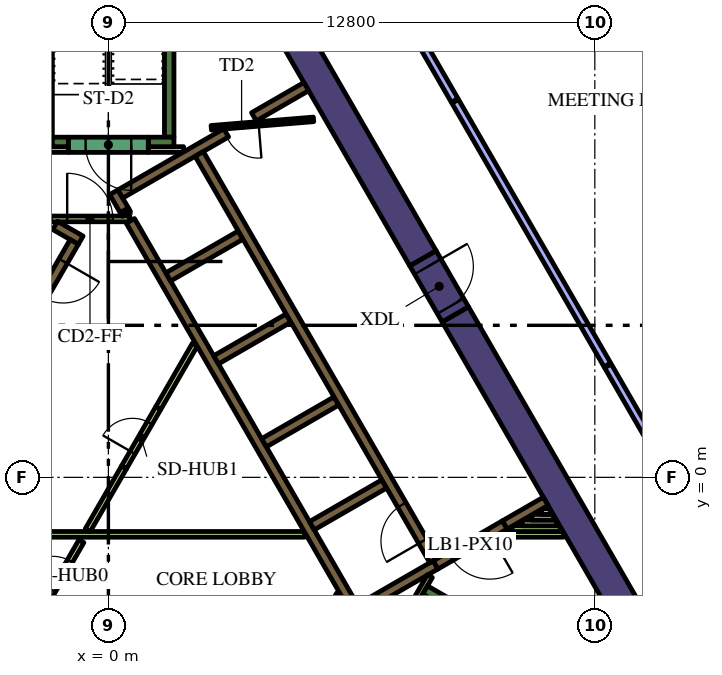
"""IFC4 building model, lengths in metres.
Left out: names, types, materials, properties, quantities, classifications, styles, units other than length and angle.
Written with IfcOpenShell. Run it as: python <this file> out.ifc"""

import sys

from ifc_helpers import new_model, si_unit, direction, frame, frame_2d, origin, place, context, subcontext, project, spatial, rectangle, extrude, element, fill, save


model = new_model("IFC4")
c1 = context("Model", 3, precision=1e-05, world=origin(), true_north=direction((0.0, 1.0)))
c2 = subcontext(c1, "Body", "Model", "MODEL_VIEW")
j1 = project(units=[si_unit("LENGTHUNIT", "METRE"), si_unit("PLANEANGLEUNIT", "RADIAN")], contexts=[c1])
p1 = place(None, origin())
s1 = spatial("IfcSite", under=j1, at=p1, CompositionType="ELEMENT")
p2 = place(p1, origin())
s2 = spatial("IfcBuilding", under=s1, at=p2, CompositionType="ELEMENT")
p3 = place(p2, frame((0.0, 0.0, 175.2)))
s3 = spatial("IfcBuildingStorey", under=s2, at=p3, CompositionType="ELEMENT", Elevation=175.2)
p4 = place(p3, frame((9.129, 4.289, 0.0), z_axis=(0.0, 0.0, 1.0), x_axis=(0.499995742806, -0.866027861663, 0.0)))
e1 = element("IfcWall", 1, at=p4, inside=s3, PredefinedType="SOLIDWALL", context=c2, shape_type="SweptSolid", body=[
    extrude(rectangle(XDim=12.527, YDim=0.8, at=frame_2d((6.264, 0.0))), origin(), (0.0, 0.0, 1.0), 4.2),
])
p5 = place(p3, frame((8.279, 5.761, 0.0), z_axis=(0.0, 0.0, 1.0), x_axis=(-0.500010359015, 0.866019422922, 0.0)))
e2 = element("IfcWall", 2, at=p5, inside=s3, PredefinedType="SOLIDWALL", context=c2, shape_type="SweptSolid", body=[
    extrude(rectangle(XDim=12.528, YDim=0.8, at=frame_2d((6.264, 0.0))), origin(), (0.0, 0.0, 1.0), 4.2),
])
p6 = place(p3, frame((8.334, -2.964, 0.0), z_axis=(0.0, 0.0, 1.0), x_axis=(0.866016039709, -0.500016218704, 0.0)))
e3 = element("IfcWall", 3, at=p6, inside=s3, PredefinedType="SOLIDWALL", context=c2, shape_type="SweptSolid", body=[
    extrude(rectangle(XDim=7.05, YDim=0.25, at=frame_2d((3.525, 0.0))), origin(), (0.0, 0.0, 1.0), 4.2),
])
p7 = place(p3, frame((8.168, -3.503, 0.0), z_axis=(0.0, 0.0, 1.0), x_axis=(0.49972245349, 0.866185586049, 0.0)))
e4 = element("IfcWall", 4, at=p7, inside=s3, PredefinedType="SOLIDWALL", context=c2, shape_type="SweptSolid", body=[
    extrude(rectangle(XDim=0.425, YDim=0.25, at=frame_2d((0.212, 0.0))), origin(), (0.0, 0.0, 1.0), 4.2),
])
p8 = place(p3, frame((1.6, 8.95, 0.0), z_axis=(0.0, 0.0, 1.0), x_axis=(0.0, 1.0, 0.0)))
e5 = element("IfcWall", 5, at=p8, inside=s3, PredefinedType="SOLIDWALL", context=c2, shape_type="SweptSolid", body=[
    extrude(rectangle(XDim=6.8, YDim=0.25, at=frame_2d((3.4, 0.0))), origin(), (0.0, 0.0, 1.0), 4.2),
])
p9 = place(p3, frame((1.05, 8.825, 0.0), z_axis=(0.0, 0.0, 1.0), x_axis=(1.0, 0.0, 0.0)))
e6 = element("IfcWall", 6, at=p9, inside=s3, PredefinedType="SOLIDWALL", context=c2, shape_type="SweptSolid", body=[
    extrude(rectangle(XDim=0.675, YDim=0.25, at=frame_2d((0.337, 0.0))), origin(), (0.0, 0.0, 1.0), 4.2),
])
p10 = place(p3, frame((-1.6, 8.7, 0.0), z_axis=(0.0, 0.0, 1.0), x_axis=(0.0, 1.0, 0.0)))
e7 = element("IfcWall", 7, at=p10, inside=s3, PredefinedType="SOLIDWALL", context=c2, shape_type="SweptSolid", body=[
    extrude(rectangle(XDim=7.05, YDim=0.25, at=frame_2d((3.525, 0.0))), origin(), (0.0, 0.0, 1.0), 4.2),
])
p11 = place(p3, frame((-1.475, 8.825, 0.0), z_axis=(0.0, 0.0, 1.0), x_axis=(1.0, 0.0, 0.0)))
e8 = element("IfcWall", 8, at=p11, inside=s3, PredefinedType="SOLIDWALL", context=c2, shape_type="SweptSolid", body=[
    extrude(rectangle(XDim=0.425, YDim=0.25, at=frame_2d((0.212, 0.0))), origin(), (0.0, 0.0, 1.0), 4.2),
])
p12 = place(p3, frame((11.507, -0.631, 0.0), z_axis=(0.0, 0.0, 1.0), x_axis=(-0.866025525965, -0.499999788377, 0.0)))
e9 = element("IfcWall", 9, at=p12, inside=s3, PredefinedType="SOLIDWALL", context=c2, shape_type="SweptSolid", body=[
    extrude(rectangle(XDim=1.245, YDim=0.25, at=frame_2d((0.622, 0.0))), origin(), (0.0, 0.0, 1.0), 4.2),
])
p13 = place(p3, frame((0.473, 6.93, 0.0), z_axis=(0.0, 0.0, 1.0), x_axis=(-0.49972245349, 0.866185586049, 0.0)))
e10 = element("IfcWall", 10, at=p13, inside=s3, PredefinedType="SOLIDWALL", context=c2, shape_type="SweptSolid", body=[
    extrude(rectangle(XDim=0.11, YDim=0.25, at=frame_2d((0.055, 0.0))), origin(), (0.0, 0.0, 1.0), 4.2),
])
p14 = place(p3, frame((6.568, -3.627, 0.0), z_axis=(0.0, 0.0, 1.0), x_axis=(-0.499999455981, 0.866025717874, 0.0)))
e11 = element("IfcWall", 11, at=p14, inside=s3, PredefinedType="SOLIDWALL", context=c2, shape_type="SweptSolid", body=[
    extrude(rectangle(XDim=11.978, YDim=0.25, at=frame_2d((5.989, 0.0))), origin(), (0.0, 0.0, 1.0), 4.2),
])
p15 = place(p3, frame((0.417, 7.027, 0.0), z_axis=(0.0, 0.0, 1.0), x_axis=(-0.500210807569, 0.865903659763, 0.0)))
e12 = element("IfcWall", 12, at=p15, inside=s3, PredefinedType="SOLIDWALL", context=c2, shape_type="SweptSolid", body=[
    extrude(rectangle(XDim=0.548, YDim=0.25, at=frame_2d((0.274, 0.0))), origin(), (0.0, 0.0, 1.0), 4.2),
])
p16 = place(p3, frame((3.1, 9.064, 0.0), z_axis=(0.0, 0.0, 1.0), x_axis=(-0.866030133475, -0.499991807846, 0.0)))
e13 = element("IfcWall", 13, at=p16, inside=s3, PredefinedType="SOLIDWALL", context=c2, shape_type="SweptSolid", body=[
    extrude(rectangle(XDim=3.217, YDim=0.25, at=frame_2d((1.608, 0.0))), origin(), (0.0, 0.0, 1.0), 4.2),
])
p17 = place(p3, frame((1.574, 5.274, 0.0), z_axis=(0.0, 0.0, 1.0), x_axis=(0.866028486751, 0.499994660107, 0.0)))
e14 = element("IfcWall", 14, at=p17, inside=s3, PredefinedType="SOLIDWALL", context=c2, shape_type="SweptSolid", body=[
    extrude(rectangle(XDim=2.2, YDim=0.25, at=frame_2d((1.1, 0.0))), origin(), (0.0, 0.0, 1.0), 4.2),
])
for number, where, z_axis, x_axis in (
    (15, (2.834, 3.091, 0.0), (0.0, 0.0, 1.0), (0.866, 0.5, 0.0)),
    (16, (4.094, 0.909, 0.0), (0.0, 0.0, 1.0), (0.866, 0.5, 0.0)),
    (17, (5.354, -1.274, 0.0), (0.0, 0.0, 1.0), (0.866, 0.5, 0.0)),
):
    element("IfcWall", number, at=place(p3, frame(where, z_axis=z_axis, x_axis=x_axis)), inside=s3, PredefinedType="SOLIDWALL", context=c2, shape_type="SweptSolid", body=[
        extrude(rectangle(XDim=2.2, YDim=0.25, at=frame_2d((1.1, 0.0))), origin(), (0.0, 0.0, 1.0), 4.2),
    ])
p18 = place(p3, frame((6.614, -3.456, 0.0), z_axis=(0.0, 0.0, 1.0), x_axis=(0.866025089694, 0.500000544019, 0.0)))
e18 = element("IfcWall", 18, at=p18, inside=s3, PredefinedType="SOLIDWALL", context=c2, shape_type="SweptSolid", body=[
    extrude(rectangle(XDim=2.305, YDim=0.25, at=frame_2d((1.153, 0.0))), origin(), (0.0, 0.0, 1.0), 4.2),
])
p19 = place(p3, frame((3.83, 9.486, 0.0), z_axis=(0.0, 0.0, 1.0), x_axis=(0.865986202621, 0.500067892261, 0.0)))
e19 = element("IfcWall", 19, at=p19, inside=s3, PredefinedType="SOLIDWALL", context=c2, shape_type="SweptSolid", body=[
    extrude(rectangle(XDim=1.591, YDim=0.25, at=frame_2d((0.795, 0.0))), origin(), (0.0, 0.0, 1.0), 4.2),
])
p20 = place(p3, frame((-0.728, 6.24, 0.0), z_axis=(0.0, 0.0, 1.0), x_axis=(-0.865955664968, 0.500120771724, 0.0)))
e20 = element("IfcWall", 20, at=p20, inside=s3, PredefinedType="SOLIDWALL", context=c2, shape_type="SweptSolid", body=[
    extrude(rectangle(XDim=0.778, YDim=0.25, at=frame_2d((0.389, 0.0))), origin(), (0.0, 0.0, 1.0), 4.2),
])
p21 = place(p3, frame((1.05, 8.625, 0.0), z_axis=(0.0, 0.0, 1.0), x_axis=(1.0, 0.0, 0.0)))
e21 = element("IfcWall", 21, at=p21, inside=s3, PredefinedType="PARTITIONING", context=c2, shape_type="SweptSolid", body=[
    extrude(rectangle(XDim=0.929, YDim=0.15, at=frame_2d((0.464, 0.0))), origin(), (0.0, 0.0, 1.0), 3.15),
])
p22 = place(p3, frame((-1.564, 8.625, 0.0), z_axis=(0.0, 0.0, 1.0), x_axis=(1.0, 0.0, 0.0)))
e22 = element("IfcWall", 22, at=p22, inside=s3, PredefinedType="PARTITIONING", context=c2, shape_type="SweptSolid", body=[
    extrude(rectangle(XDim=0.514, YDim=0.15, at=frame_2d((0.257, 0.0))), origin(), (0.0, 0.0, 1.0), 3.15),
])
p23 = place(p3, frame((10.362, -1.5, 0.0), z_axis=(0.0, 0.0, 1.0), x_axis=(1.0, 0.0, 0.0)))
e23 = element("IfcWall", 23, at=p23, inside=s3, PredefinedType="PARTITIONING", context=c2, shape_type="SweptSolid", body=[
    extrude(rectangle(XDim=1.61, YDim=0.15, at=frame_2d((0.805, 0.0))), origin(), (0.0, 0.0, 1.0), 3.15),
])
p24 = place(p3, frame((10.622, -1.35, 0.0), z_axis=(0.0, 0.0, 1.0), x_axis=(1.0, 0.0, 0.0)))
e24 = element("IfcWall", 24, at=p24, inside=s3, PredefinedType="PARTITIONING", context=c2, shape_type="SweptSolid", body=[
    extrude(rectangle(XDim=1.263, YDim=0.15, at=frame_2d((0.632, 0.0))), origin(), (0.0, 0.0, 1.0), 3.15),
])
p25 = place(p3, frame((10.882, -1.2, 0.0), z_axis=(0.0, 0.0, 1.0), x_axis=(1.0, 0.0, 0.0)))
e25 = element("IfcWall", 25, at=p25, inside=s3, PredefinedType="PARTITIONING", context=c2, shape_type="SweptSolid", body=[
    extrude(rectangle(XDim=0.917, YDim=0.15, at=frame_2d((0.459, 0.0))), origin(), (0.0, 0.0, 1.0), 3.15),
])
p26 = place(p3, frame((11.712, -1.05, 0.0), z_axis=(0.0, 0.0, 1.0), x_axis=(-1.0, 0.0, 0.0)))
e26 = element("IfcWall", 26, at=p26, inside=s3, PredefinedType="PARTITIONING", context=c2, shape_type="SweptSolid", body=[
    extrude(rectangle(XDim=0.571, YDim=0.15, at=frame_2d((0.285, 0.0))), origin(), (0.0, 0.0, 1.0), 3.15),
])
p27 = place(p3, frame((11.401, -0.9, 0.0), z_axis=(0.0, 0.0, 1.0), x_axis=(1.0, 0.0, 0.0)))
e27 = element("IfcWall", 27, at=p27, inside=s3, PredefinedType="PARTITIONING", context=c2, shape_type="SweptSolid", body=[
    extrude(rectangle(XDim=0.224, YDim=0.15, at=frame_2d((0.112, 0.0))), origin(), (0.0, 0.0, 1.0), 3.15),
])
p28 = place(p3, frame((8.459, -2.599, 0.0), z_axis=(0.0, 0.0, 1.0), x_axis=(-0.500041054325, -0.866001699761, 0.0)))
e28 = element("IfcWall", 28, at=p28, inside=s3, PredefinedType="PARTITIONING", context=c2, shape_type="SweptSolid", body=[
    extrude(rectangle(XDim=0.929, YDim=0.15, at=frame_2d((0.464, 0.0))), origin(), (0.0, 0.0, 1.0), 4.2),
])
p29 = place(p3, frame((5.705, -3.718, 0.0), z_axis=(0.0, 0.0, 1.0), x_axis=(0.499962090823, 0.866047289552, 0.0)))
e29 = element("IfcWall", 29, at=p29, inside=s3, PredefinedType="PARTITIONING", context=c2, shape_type="SweptSolid", body=[
    extrude(rectangle(XDim=0.735, YDim=0.15, at=frame_2d((0.367, 0.0))), origin(), (0.0, 0.0, 1.0), 3.15),
])
p30 = place(p3, frame((-4.2, -1.5, 0.0), z_axis=(0.0, 0.0, 1.0), x_axis=(1.0, 0.0, 0.0)))
e30 = element("IfcWall", 30, at=p30, inside=s3, PredefinedType="PARTITIONING", context=c2, shape_type="SweptSolid", body=[
    extrude(rectangle(XDim=9.359, YDim=0.15, at=frame_2d((4.68, 0.0))), origin(), (0.0, 0.0, 1.0), 3.15),
])
p31 = place(p3, frame((-0.544, -1.393, 0.0), z_axis=(0.0, 0.0, 1.0), x_axis=(0.499928740635, 0.866066541489, 0.0)))
e31 = element("IfcWall", 31, at=p31, inside=s3, PredefinedType="PARTITIONING", context=c2, shape_type="SweptSolid", body=[
    extrude(rectangle(XDim=1.912, YDim=0.15, at=frame_2d((0.956, 0.0))), origin(), (0.0, 0.0, 1.0), 3.15),
])
p32 = place(p3, frame((1.312, 1.822, 0.0), z_axis=(0.0, 0.0, 1.0), x_axis=(0.500003549559, 0.866023354436, 0.0)))
e32 = element("IfcWall", 32, at=p32, inside=s3, PredefinedType="PARTITIONING", context=c2, shape_type="SweptSolid", body=[
    extrude(rectangle(XDim=1.93, YDim=0.15, at=frame_2d((0.965, 0.0))), origin(), (0.0, 0.0, 1.0), 3.15),
])
p33 = place(p3, frame((8.565, -2.185, 0.0), z_axis=(0.0, 0.0, 1.0), x_axis=(-0.499997954832, 0.866026584559, 0.0)))
e33 = element("IfcWall", 33, at=p33, inside=s3, PredefinedType="SOLIDWALL", context=c2, shape_type="SweptSolid", body=[
    extrude(rectangle(XDim=12.35, YDim=0.25, at=frame_2d((6.175, 0.0))), origin(), (0.0, 0.0, 1.0), 4.2),
])
p34 = place(p33, frame((0.585, 0.0, 0.0)))
e34 = element("IfcOpeningElement", 34, at=p34, cuts=e33, PredefinedType="OPENING", context=c2, shape_type="SweptSolid", body=[
    extrude(rectangle(XDim=1.1, YDim=2.1, at=frame_2d((0.55, 1.05))), frame((0.0, 0.135, 0.0), z_axis=(0.0, -1.0, 0.0), x_axis=(1.0, 0.0, 0.0)), (0.0, 0.0, 1.0), 0.27),
])
p35 = place(p3, frame((-0.898, 6.194, 0.0), z_axis=(0.0, 0.0, 1.0), x_axis=(-0.499996202215, -0.866027596426, 0.0)))
e35 = element("IfcWall", 35, at=p35, inside=s3, PredefinedType="SOLIDWALL", context=c2, shape_type="SweptSolid", body=[
    extrude(rectangle(XDim=9.83, YDim=0.25, at=frame_2d((4.915, 0.0))), origin(), (0.0, 0.0, 1.0), 4.2),
])
p36 = place(p35, frame((0.585, 0.0, 0.0)))
e36 = element("IfcOpeningElement", 36, at=p36, cuts=e35, PredefinedType="OPENING", context=c2, shape_type="SweptSolid", body=[
    extrude(rectangle(XDim=1.1, YDim=2.1, at=frame_2d((0.55, 1.05))), frame((0.0, 0.135, 0.0), z_axis=(0.0, -1.0, 0.0), x_axis=(1.0, 0.0, 0.0)), (0.0, 0.0, 1.0), 0.27),
])
p37 = place(p35, frame((3.105, 0.0, 0.0)))
e37 = element("IfcOpeningElement", 37, at=p37, cuts=e35, PredefinedType="OPENING", context=c2, shape_type="SweptSolid", body=[
    extrude(rectangle(XDim=1.1, YDim=2.1, at=frame_2d((0.55, 1.05))), frame((0.0, 0.135, 0.0), z_axis=(0.0, -1.0, 0.0), x_axis=(1.0, 0.0, 0.0)), (0.0, 0.0, 1.0), 0.27),
])
p38 = place(p35, frame((5.625, 0.0, 0.0)))
e38 = element("IfcOpeningElement", 38, at=p38, cuts=e35, PredefinedType="OPENING", context=c2, shape_type="SweptSolid", body=[
    extrude(rectangle(XDim=1.1, YDim=2.1, at=frame_2d((0.55, 1.05))), frame((0.0, 0.135, 0.0), z_axis=(0.0, -1.0, 0.0), x_axis=(1.0, 0.0, 0.0)), (0.0, 0.0, 1.0), 0.27),
])
p39 = place(p35, frame((8.145, 0.0, 0.0)))
e39 = element("IfcOpeningElement", 39, at=p39, cuts=e35, PredefinedType="OPENING", context=c2, shape_type="SweptSolid", body=[
    extrude(rectangle(XDim=1.1, YDim=2.1, at=frame_2d((0.55, 1.05))), frame((0.0, 0.135, 0.0), z_axis=(0.0, -1.0, 0.0), x_axis=(1.0, 0.0, 0.0)), (0.0, 0.0, 1.0), 0.27),
])
p40 = place(p3, frame((1.05, 8.75, 0.0), z_axis=(0.0, 0.0, 1.0), x_axis=(-1.0, 0.0, 0.0)))
e40 = element("IfcWall", 40, at=p40, inside=s3, PredefinedType="SOLIDWALL", context=c2, shape_type="SweptSolid", body=[
    extrude(rectangle(XDim=2.1, YDim=0.4, at=frame_2d((1.05, 0.0))), origin(), (0.0, 0.0, 1.0), 4.2),
])
p41 = place(p40, frame((0.45, 0.0, 0.0)))
e41 = element("IfcOpeningElement", 41, at=p41, cuts=e40, PredefinedType="OPENING", context=c2, shape_type="SweptSolid", body=[
    extrude(rectangle(XDim=1.2, YDim=2.1, at=frame_2d((0.6, 1.05))), frame((0.0, 0.21, 0.0), z_axis=(0.0, -1.0, 0.0), x_axis=(1.0, 0.0, 0.0)), (0.0, 0.0, 1.0), 0.42),
])
p42 = place(p3, frame((5.398, 9.419, 0.0), z_axis=(0.0, 0.0, 1.0), x_axis=(-0.996653416376, -0.081743303248, 0.0)))
e42 = element("IfcWall", 42, at=p42, inside=s3, PredefinedType="PARTITIONING", context=c2, shape_type="SweptSolid", body=[
    extrude(rectangle(XDim=2.7, YDim=0.12, at=frame_2d((1.35, 0.0))), origin(), (0.0, 0.0, 1.0), 3.15),
])
p43 = place(p42, frame((1.45, 0.0, 0.0)))
e43 = element("IfcOpeningElement", 43, at=p43, cuts=e42, PredefinedType="OPENING", context=c2, shape_type="SweptSolid", body=[
    extrude(rectangle(XDim=0.9, YDim=2.1, at=frame_2d((0.45, 1.05))), frame((0.0, 0.07, 0.0), z_axis=(0.0, -1.0, 0.0), x_axis=(1.0, 0.0, 0.0)), (0.0, 0.0, 1.0), 0.14),
])
p44 = place(p3, frame((-1.76, -3.498, 0.0), z_axis=(0.0, 0.0, 1.0), x_axis=(0.499977374825, 0.866038466041, 0.0)))
e44 = element("IfcWall", 44, at=p44, inside=s3, PredefinedType="PARTITIONING", context=c2, shape_type="SweptSolid", body=[
    extrude(rectangle(XDim=2.1, YDim=0.15, at=frame_2d((1.05, 0.0))), origin(), (0.0, 0.0, 1.0), 3.15),
])
p45 = place(p44, frame((0.6, 0.0, 0.0)))
e45 = element("IfcOpeningElement", 45, at=p45, cuts=e44, PredefinedType="OPENING", context=c2, shape_type="SweptSolid", body=[
    extrude(rectangle(XDim=0.9, YDim=2.1, at=frame_2d((0.45, 1.05))), frame((0.0, 0.085, 0.0), z_axis=(0.0, -1.0, 0.0), x_axis=(1.0, 0.0, 0.0)), (0.0, 0.0, 1.0), 0.17),
])
p46 = place(p3, frame((-1.534, 6.8, 0.0), z_axis=(0.0, 0.0, 1.0), x_axis=(1.0, 0.0, 0.0)))
e46 = element("IfcWall", 46, at=p46, inside=s3, PredefinedType="PARTITIONING", context=c2, shape_type="SweptSolid", body=[
    extrude(rectangle(XDim=2.1, YDim=0.15, at=frame_2d((1.05, 0.0))), origin(), (0.0, 0.0, 1.0), 3.15),
])
p47 = place(p46, frame((0.45, 0.0, 0.0)))
e47 = element("IfcOpeningElement", 47, at=p47, cuts=e46, PredefinedType="OPENING", context=c2, shape_type="SweptSolid", body=[
    extrude(rectangle(XDim=1.2, YDim=2.1, at=frame_2d((0.6, 1.05))), frame((0.0, 0.085, 0.0), z_axis=(0.0, -1.0, 0.0), x_axis=(1.0, 0.0, 0.0)), (0.0, 0.0, 1.0), 0.17),
])
p48 = place(p3, frame((10.429, -1.253, 0.0), z_axis=(0.0, 0.0, 1.0), x_axis=(-0.866009402589, -0.500027713859, 0.0)))
e48 = element("IfcWall", 48, at=p48, inside=s3, PredefinedType="SOLIDWALL", context=c2, shape_type="SweptSolid", body=[
    extrude(rectangle(XDim=2.1, YDim=0.25, at=frame_2d((1.05, 0.0))), origin(), (0.0, 0.0, 1.0), 4.2),
])
p49 = place(p48, frame((0.45, 0.0, 0.0)))
e49 = element("IfcOpeningElement", 49, at=p49, cuts=e48, PredefinedType="OPENING", context=c2, shape_type="SweptSolid", body=[
    extrude(rectangle(XDim=1.2, YDim=2.1, at=frame_2d((0.6, 1.05))), frame((0.0, 0.135, 0.0), z_axis=(0.0, -1.0, 0.0), x_axis=(1.0, 0.0, 0.0)), (0.0, 0.0, 1.0), 0.27),
])
p50 = place(p3, frame((8.279, 5.761, 0.0), z_axis=(0.0, 0.0, 1.0), x_axis=(0.500062241894, -0.865989465428, 0.0)))
e50 = element("IfcWall", 50, at=p50, inside=s3, PredefinedType="SOLIDWALL", context=c2, shape_type="SweptSolid", body=[
    extrude(rectangle(XDim=1.7, YDim=0.8, at=frame_2d((0.85, 0.0))), origin(), (0.0, 0.0, 1.0), 4.2),
])
p51 = place(p50, frame((0.25, 0.0, 0.0)))
e51 = element("IfcOpeningElement", 51, at=p51, cuts=e50, PredefinedType="OPENING", context=c2, shape_type="SweptSolid", body=[
    extrude(rectangle(XDim=1.2, YDim=2.1, at=frame_2d((0.6, 1.05))), frame((0.0, 0.41, 0.0), z_axis=(0.0, -1.0, 0.0), x_axis=(1.0, 0.0, 0.0)), (0.0, 0.0, 1.0), 0.82),
])
p52 = place(p3, frame((0.412, 0.263, 0.0), z_axis=(0.0, 0.0, 1.0), x_axis=(0.500062916607, 0.865989075817, 0.0)))
e52 = element("IfcWall", 52, at=p52, inside=s3, PredefinedType="PARTITIONING", context=c2, shape_type="SweptSolid", body=[
    extrude(rectangle(XDim=1.8, YDim=0.15, at=frame_2d((0.9, 0.0))), origin(), (0.0, 0.0, 1.0), 3.15),
])
p53 = place(p52, frame((0.45, 0.0, 0.0)))
e53 = element("IfcOpeningElement", 53, at=p53, cuts=e52, PredefinedType="OPENING", context=c2, shape_type="SweptSolid", body=[
    extrude(rectangle(XDim=0.9, YDim=2.1, at=frame_2d((0.45, 1.05))), frame((0.0, 0.085, 0.0), z_axis=(0.0, -1.0, 0.0), x_axis=(1.0, 0.0, 0.0)), (0.0, 0.0, 1.0), 0.17),
])
p54 = place(p3, frame((13.13, 2.958, 0.0), z_axis=(0.0, 0.0, 1.0), x_axis=(-0.499995158272, 0.866028199139, 0.0)))
e54 = element("IfcWall", 54, at=p54, inside=s3, PredefinedType="PARTITIONING", context=c2, shape_type="SweptSolid", body=[
    extrude(rectangle(XDim=8.008, YDim=0.2, at=frame_2d((4.004, 0.0))), origin(), (0.0, 0.0, 1.0), 3.15),
])
p55 = place(p3, frame((9.111, 9.918, 0.0), z_axis=(0.0, 0.0, 1.0), x_axis=(-0.499954382462, 0.86605173948, 0.0)))
e55 = element("IfcWall", 55, at=p55, inside=s3, PredefinedType="PARTITIONING", context=c2, shape_type="SweptSolid", body=[
    extrude(rectangle(XDim=2.278, YDim=0.2, at=frame_2d((1.139, 0.0))), origin(), (0.0, 0.0, 1.0), 3.15),
])
p56 = place(p3, frame((14.297, 0.937, 0.0), z_axis=(0.0, 0.0, 1.0), x_axis=(-0.499970234539, 0.866042588199, 0.0)))
e56 = element("IfcWall", 56, at=p56, inside=s3, PredefinedType="PARTITIONING", context=c2, shape_type="SweptSolid", body=[
    extrude(rectangle(XDim=2.303, YDim=0.2, at=frame_2d((1.151, 0.0))), origin(), (0.0, 0.0, 1.0), 3.15),
])
p57 = place(p34, origin())
e57 = element("IfcDoor", 57, at=p57, inside=s3, OperationType="DOUBLE_DOOR_SLIDING", PredefinedType="DOOR", context=c2, shape_type="SweptSolid", body=[
    extrude(rectangle(XDim=1.1, YDim=2.1, at=frame_2d((0.55, 1.05))), frame((0.0, 0.025, 0.0), z_axis=(0.0, -1.0, 0.0), x_axis=(1.0, 0.0, 0.0)), (0.0, 0.0, 1.0), 0.05),
])
fill(e34, e57)
p58 = place(p36, origin())
e58 = element("IfcDoor", 58, at=p58, inside=s3, OperationType="DOUBLE_DOOR_SLIDING", PredefinedType="DOOR", context=c2, shape_type="SweptSolid", body=[
    extrude(rectangle(XDim=1.1, YDim=2.1, at=frame_2d((0.55, 1.05))), frame((0.0, 0.025, 0.0), z_axis=(0.0, -1.0, 0.0), x_axis=(1.0, 0.0, 0.0)), (0.0, 0.0, 1.0), 0.05),
])
fill(e36, e58)
p59 = place(p41, origin())
e59 = element("IfcDoor", 59, at=p59, inside=s3, OperationType="SINGLE_SWING_LEFT", PredefinedType="DOOR", context=c2, shape_type="SweptSolid", body=[
    extrude(rectangle(XDim=1.2, YDim=2.1, at=frame_2d((0.6, 1.05))), frame((0.0, 0.025, 0.0), z_axis=(0.0, -1.0, 0.0), x_axis=(1.0, 0.0, 0.0)), (0.0, 0.0, 1.0), 0.05),
])
fill(e41, e59)
p60 = place(p43, origin())
e60 = element("IfcDoor", 60, at=p60, inside=s3, OperationType="SINGLE_SWING_LEFT", PredefinedType="DOOR", context=c2, shape_type="SweptSolid", body=[
    extrude(rectangle(XDim=0.9, YDim=2.1, at=frame_2d((0.45, 1.05))), frame((0.0, 0.025, 0.0), z_axis=(0.0, -1.0, 0.0), x_axis=(1.0, 0.0, 0.0)), (0.0, 0.0, 1.0), 0.05),
])
fill(e43, e60)
p61 = place(p45, origin())
e61 = element("IfcDoor", 61, at=p61, inside=s3, OperationType="SINGLE_SWING_LEFT", PredefinedType="DOOR", context=c2, shape_type="SweptSolid", body=[
    extrude(rectangle(XDim=0.9, YDim=2.1, at=frame_2d((0.45, 1.05))), frame((0.0, 0.025, 0.0), z_axis=(0.0, -1.0, 0.0), x_axis=(1.0, 0.0, 0.0)), (0.0, 0.0, 1.0), 0.05),
])
fill(e45, e61)
p62 = place(p47, origin())
e62 = element("IfcDoor", 62, at=p62, inside=s3, OperationType="SINGLE_SWING_LEFT", PredefinedType="DOOR", context=c2, shape_type="SweptSolid", body=[
    extrude(rectangle(XDim=1.2, YDim=2.1, at=frame_2d((0.6, 1.05))), frame((0.0, 0.025, 0.0), z_axis=(0.0, -1.0, 0.0), x_axis=(1.0, 0.0, 0.0)), (0.0, 0.0, 1.0), 0.05),
])
fill(e47, e62)
p63 = place(p49, origin())
e63 = element("IfcDoor", 63, at=p63, inside=s3, OperationType="SINGLE_SWING_LEFT", PredefinedType="DOOR", context=c2, shape_type="SweptSolid", body=[
    extrude(rectangle(XDim=1.2, YDim=2.1, at=frame_2d((0.6, 1.05))), frame((0.0, 0.025, 0.0), z_axis=(0.0, -1.0, 0.0), x_axis=(1.0, 0.0, 0.0)), (0.0, 0.0, 1.0), 0.05),
])
fill(e49, e63)
p64 = place(p51, origin())
e64 = element("IfcDoor", 64, at=p64, inside=s3, OperationType="SINGLE_SWING_LEFT", PredefinedType="DOOR", context=c2, shape_type="SweptSolid", body=[
    extrude(rectangle(XDim=1.2, YDim=2.1, at=frame_2d((0.6, 1.05))), frame((0.0, 0.025, 0.0), z_axis=(0.0, -1.0, 0.0), x_axis=(1.0, 0.0, 0.0)), (0.0, 0.0, 1.0), 0.05),
])
fill(e51, e64)
p65 = place(p53, origin())
e65 = element("IfcDoor", 65, at=p65, inside=s3, OperationType="SINGLE_SWING_LEFT", PredefinedType="DOOR", context=c2, shape_type="SweptSolid", body=[
    extrude(rectangle(XDim=0.9, YDim=2.1, at=frame_2d((0.45, 1.05))), frame((0.0, 0.025, 0.0), z_axis=(0.0, -1.0, 0.0), x_axis=(1.0, 0.0, 0.0)), (0.0, 0.0, 1.0), 0.05),
])
fill(e53, e65)
save(model, sys.argv[1])
